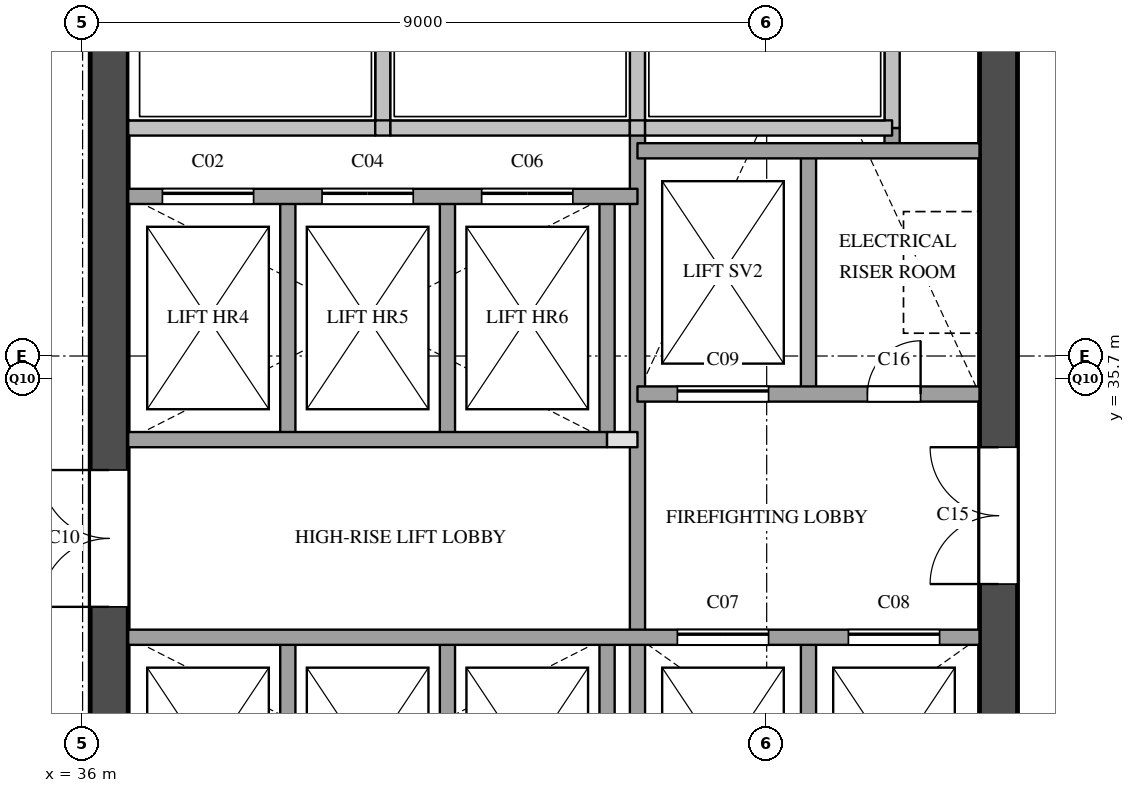
"""IFC4 building model, lengths in metres.
Left out: names, types, materials, properties, quantities, classifications, styles, units other than length and angle.
Written with IfcOpenShell. Run it as: python <this file> out.ifc"""

import sys

from ifc_helpers import new_model, si_unit, direction, frame, frame_2d, origin, place, context, subcontext, project, spatial, rectangle, extrude, element, fill, save


model = new_model("IFC4")
c1 = context("Model", 3, precision=1e-05, world=origin(), true_north=direction((0.0, 1.0)))
c2 = subcontext(c1, "Body", "Model", "MODEL_VIEW")
j1 = project(units=[si_unit("LENGTHUNIT", "METRE"), si_unit("PLANEANGLEUNIT", "RADIAN")], contexts=[c1])
p1 = place(None, origin())
s1 = spatial("IfcSite", under=j1, at=p1, CompositionType="ELEMENT")
p2 = place(p1, origin())
s2 = spatial("IfcBuilding", under=s1, at=p2, CompositionType="ELEMENT")
p3 = place(p2, frame((0.0, 0.0, 193.4)))
s3 = spatial("IfcBuildingStorey", under=s2, at=p3, CompositionType="ELEMENT", Elevation=193.4)
p4 = place(p3, frame((36.35, 29.1, 0.0), z_axis=(0.0, 0.0, 1.0), x_axis=(0.0, 1.0, 0.0)))
e1 = element("IfcWall", 1, at=p4, inside=s3, PredefinedType="SHEAR", context=c2, shape_type="SweptSolid", body=[
    extrude(rectangle(XDim=20.3, YDim=0.5, at=frame_2d((10.15, 0.0))), origin(), (0.0, 0.0, 1.0), 3.4),
])
p5 = place(p4, frame((3.6, 0.0, 0.0)))
e2 = element("IfcOpeningElement", 2, at=p5, cuts=e1, PredefinedType="OPENING", context=c2, shape_type="SweptSolid", body=[
    extrude(rectangle(XDim=1.8, YDim=2.1, at=frame_2d((0.9, 1.05))), frame((0.0, 0.26, 0.0), z_axis=(0.0, -1.0, 0.0), x_axis=(1.0, 0.0, 0.0)), (0.0, 0.0, 1.0), 0.52),
])
p6 = place(p4, frame((16.4, 0.0, 0.0)))
e3 = element("IfcOpeningElement", 3, at=p6, cuts=e1, PredefinedType="OPENING", context=c2, shape_type="SweptSolid", body=[
    extrude(rectangle(XDim=1.0, YDim=2.1, at=frame_2d((0.5, 1.05))), frame((0.0, 0.26, 0.0), z_axis=(0.0, -1.0, 0.0), x_axis=(1.0, 0.0, 0.0)), (0.0, 0.0, 1.0), 0.52),
])
p7 = place(p3, frame((48.05, 29.1, 0.0), z_axis=(0.0, 0.0, 1.0), x_axis=(0.0, 1.0, 0.0)))
e4 = element("IfcWall", 4, at=p7, inside=s3, PredefinedType="SHEAR", context=c2, shape_type="SweptSolid", body=[
    extrude(rectangle(XDim=20.3, YDim=0.5, at=frame_2d((10.15, 0.0))), origin(), (0.0, 0.0, 1.0), 3.4),
])
p8 = place(p7, frame((12.5, 0.0, 0.0)))
e5 = element("IfcOpeningElement", 5, at=p8, cuts=e4, PredefinedType="OPENING", context=c2, shape_type="SweptSolid", body=[
    extrude(rectangle(XDim=0.7, YDim=2.1, at=frame_2d((0.35, 1.05))), frame((0.0, 0.26, 0.0), z_axis=(0.0, -1.0, 0.0), x_axis=(1.0, 0.0, 0.0)), (0.0, 0.0, 1.0), 0.52),
])
p9 = place(p7, frame((3.9, 0.0, 0.0)))
e6 = element("IfcOpeningElement", 6, at=p9, cuts=e4, PredefinedType="OPENING", context=c2, shape_type="SweptSolid", body=[
    extrude(rectangle(XDim=1.8, YDim=2.1, at=frame_2d((0.9, 1.05))), frame((0.0, 0.26, 0.0), z_axis=(0.0, -1.0, 0.0), x_axis=(1.0, 0.0, 0.0)), (0.0, 0.0, 1.0), 0.52),
])
p10 = place(p3, frame((38.7, 29.1, 0.0), z_axis=(0.0, 0.0, 1.0), x_axis=(0.0, 1.0, 0.0)))
e7 = element("IfcWall", 7, at=p10, inside=s3, PredefinedType="SOLIDWALL", context=c2, shape_type="SweptSolid", body=[
    extrude(rectangle(XDim=3.2, YDim=0.2, at=frame_2d((1.6, 0.0))), origin(), (0.0, 0.0, 1.0), 3.4),
])
p11 = place(p3, frame((38.7, 34.9, 0.0), z_axis=(0.0, 0.0, 1.0), x_axis=(0.0, 1.0, 0.0)))
e8 = element("IfcWall", 8, at=p11, inside=s3, PredefinedType="SOLIDWALL", context=c2, shape_type="SweptSolid", body=[
    extrude(rectangle(XDim=3.2, YDim=0.2, at=frame_2d((1.6, 0.0))), origin(), (0.0, 0.0, 1.0), 3.4),
])
p12 = place(p3, frame((39.95, 39.0, 0.0), z_axis=(0.0, 0.0, 1.0), x_axis=(0.0, 1.0, 0.0)))
e9 = element("IfcWall", 9, at=p12, inside=s3, PredefinedType="SOLIDWALL", context=c2, shape_type="SweptSolid", body=[
    extrude(rectangle(XDim=1.78, YDim=0.2, at=frame_2d((0.89, 0.0))), origin(), (0.0, 0.0, 1.0), 3.4),
])
p13 = place(p3, frame((40.8, 29.1, 0.0), z_axis=(0.0, 0.0, 1.0), x_axis=(0.0, 1.0, 0.0)))
e10 = element("IfcWall", 10, at=p13, inside=s3, PredefinedType="SOLIDWALL", context=c2, shape_type="SweptSolid", body=[
    extrude(rectangle(XDim=3.2, YDim=0.2, at=frame_2d((1.6, 0.0))), origin(), (0.0, 0.0, 1.0), 3.4),
])
p14 = place(p3, frame((40.8, 34.9, 0.0), z_axis=(0.0, 0.0, 1.0), x_axis=(0.0, 1.0, 0.0)))
e11 = element("IfcWall", 11, at=p14, inside=s3, PredefinedType="SOLIDWALL", context=c2, shape_type="SweptSolid", body=[
    extrude(rectangle(XDim=3.2, YDim=0.2, at=frame_2d((1.6, 0.0))), origin(), (0.0, 0.0, 1.0), 3.4),
])
p15 = place(p3, frame((42.9, 29.1, 0.0), z_axis=(0.0, 0.0, 1.0), x_axis=(0.0, 1.0, 0.0)))
e12 = element("IfcWall", 12, at=p15, inside=s3, PredefinedType="SOLIDWALL", context=c2, shape_type="SweptSolid", body=[
    extrude(rectangle(XDim=3.2, YDim=0.2, at=frame_2d((1.6, 0.0))), origin(), (0.0, 0.0, 1.0), 3.4),
])
p16 = place(p3, frame((42.9, 34.9, 0.0), z_axis=(0.0, 0.0, 1.0), x_axis=(0.0, 1.0, 0.0)))
e13 = element("IfcWall", 13, at=p16, inside=s3, PredefinedType="SOLIDWALL", context=c2, shape_type="SweptSolid", body=[
    extrude(rectangle(XDim=3.2, YDim=0.2, at=frame_2d((1.6, 0.0))), origin(), (0.0, 0.0, 1.0), 3.4),
])
p17 = place(p3, frame((43.3, 29.1, 0.0), z_axis=(0.0, 0.0, 1.0), x_axis=(0.0, 1.0, 0.0)))
e14 = element("IfcWall", 14, at=p17, inside=s3, PredefinedType="SOLIDWALL", context=c2, shape_type="SweptSolid", body=[
    extrude(rectangle(XDim=9.9, YDim=0.2, at=frame_2d((4.95, 0.0))), origin(), (0.0, 0.0, 1.0), 3.4),
])
p18 = place(p3, frame((43.3, 39.0, 0.0), z_axis=(0.0, 0.0, 1.0), x_axis=(0.0, 1.0, 0.0)))
e15 = element("IfcWall", 15, at=p18, inside=s3, PredefinedType="SOLIDWALL", context=c2, shape_type="SweptSolid", body=[
    extrude(rectangle(XDim=1.78, YDim=0.2, at=frame_2d((0.89, 0.0))), origin(), (0.0, 0.0, 1.0), 3.4),
])
for number, where, z_axis, x_axis in (
    (16, (45.55, 29.1, 0.0), (0.0, 0.0, 1.0), (0.0, 1.0, 0.0)),
    (17, (45.55, 35.5, 0.0), (0.0, 0.0, 1.0), (0.0, 1.0, 0.0)),
):
    element("IfcWall", number, at=place(p3, frame(where, z_axis=z_axis, x_axis=x_axis)), inside=s3, PredefinedType="SOLIDWALL", context=c2, shape_type="SweptSolid", body=[
        extrude(rectangle(XDim=3.2, YDim=0.2, at=frame_2d((1.6, 0.0))), origin(), (0.0, 0.0, 1.0), 3.4),
    ])
p19 = place(p3, frame((46.65, 38.7, 0.0), z_axis=(0.0, 0.0, 1.0), x_axis=(0.0, 1.0, 0.0)))
e18 = element("IfcWall", 18, at=p19, inside=s3, PredefinedType="SOLIDWALL", context=c2, shape_type="SweptSolid", body=[
    extrude(rectangle(XDim=0.3, YDim=0.2, at=frame_2d((0.15, 0.0))), origin(), (0.0, 0.0, 1.0), 3.4),
])
p20 = place(p3, frame((46.65, 39.0, 0.0), z_axis=(0.0, 0.0, 1.0), x_axis=(0.0, 1.0, 0.0)))
e19 = element("IfcWall", 19, at=p20, inside=s3, PredefinedType="SOLIDWALL", context=c2, shape_type="SweptSolid", body=[
    extrude(rectangle(XDim=1.78, YDim=0.2, at=frame_2d((0.89, 0.0))), origin(), (0.0, 0.0, 1.0), 3.4),
])
p21 = place(p3, frame((36.6, 32.3, 0.0), z_axis=(0.0, 0.0, 1.0), x_axis=(1.0, 0.0, 0.0)))
e20 = element("IfcWall", 20, at=p21, inside=s3, PredefinedType="SOLIDWALL", context=c2, shape_type="SweptSolid", body=[
    extrude(rectangle(XDim=11.2, YDim=0.2, at=frame_2d((5.6, 0.0))), origin(), (0.0, 0.0, 1.0), 3.4),
])
p22 = place(p21, frame((7.225, 0.0, 0.0)))
e21 = element("IfcOpeningElement", 21, at=p22, cuts=e20, PredefinedType="OPENING", context=c2, shape_type="SweptSolid", body=[
    extrude(rectangle(XDim=1.2, YDim=2.1, at=frame_2d((0.6, 1.05))), frame((0.0, 0.11, 0.0), z_axis=(0.0, -1.0, 0.0), x_axis=(1.0, 0.0, 0.0)), (0.0, 0.0, 1.0), 0.22),
])
p23 = place(p21, frame((9.475, 0.0, 0.0)))
e22 = element("IfcOpeningElement", 22, at=p23, cuts=e20, PredefinedType="OPENING", context=c2, shape_type="SweptSolid", body=[
    extrude(rectangle(XDim=1.2, YDim=2.1, at=frame_2d((0.6, 1.05))), frame((0.0, 0.11, 0.0), z_axis=(0.0, -1.0, 0.0), x_axis=(1.0, 0.0, 0.0)), (0.0, 0.0, 1.0), 0.22),
])
p24 = place(p3, frame((42.9, 34.9, 0.0), z_axis=(0.0, 0.0, 1.0), x_axis=(1.0, 0.0, 0.0)))
e23 = element("IfcWall", 23, at=p24, inside=s3, PredefinedType="PARTITIONING", context=c2, shape_type="SweptSolid", body=[
    extrude(rectangle(XDim=0.4, YDim=0.2, at=frame_2d((0.2, 0.0))), origin(), (0.0, 0.0, 1.0), 3.4),
])
p25 = place(p3, frame((36.6, 34.9, 0.0), z_axis=(0.0, 0.0, 1.0), x_axis=(1.0, 0.0, 0.0)))
e24 = element("IfcWall", 24, at=p25, inside=s3, PredefinedType="SOLIDWALL", context=c2, shape_type="SweptSolid", body=[
    extrude(rectangle(XDim=6.3, YDim=0.2, at=frame_2d((3.15, 0.0))), origin(), (0.0, 0.0, 1.0), 3.4),
])
p26 = place(p3, frame((43.3, 35.5, 0.0), z_axis=(0.0, 0.0, 1.0), x_axis=(1.0, 0.0, 0.0)))
e25 = element("IfcWall", 25, at=p26, inside=s3, PredefinedType="SOLIDWALL", context=c2, shape_type="SweptSolid", body=[
    extrude(rectangle(XDim=4.5, YDim=0.2, at=frame_2d((2.25, 0.0))), origin(), (0.0, 0.0, 1.0), 3.4),
])
p27 = place(p26, frame((0.525, 0.0, 0.0)))
e26 = element("IfcOpeningElement", 26, at=p27, cuts=e25, PredefinedType="OPENING", context=c2, shape_type="SweptSolid", body=[
    extrude(rectangle(XDim=1.2, YDim=2.1, at=frame_2d((0.6, 1.05))), frame((0.0, 0.11, 0.0), z_axis=(0.0, -1.0, 0.0), x_axis=(1.0, 0.0, 0.0)), (0.0, 0.0, 1.0), 0.22),
])
p28 = place(p26, frame((3.025, 0.0, 0.0)))
e27 = element("IfcOpeningElement", 27, at=p28, cuts=e25, PredefinedType="OPENING", context=c2, shape_type="SweptSolid", body=[
    extrude(rectangle(XDim=0.7, YDim=2.1, at=frame_2d((0.35, 1.05))), frame((0.0, 0.11, 0.0), z_axis=(0.0, -1.0, 0.0), x_axis=(1.0, 0.0, 0.0)), (0.0, 0.0, 1.0), 0.22),
])
p29 = place(p3, frame((36.6, 38.1, 0.0), z_axis=(0.0, 0.0, 1.0), x_axis=(1.0, 0.0, 0.0)))
e28 = element("IfcWall", 28, at=p29, inside=s3, PredefinedType="SOLIDWALL", context=c2, shape_type="SweptSolid", body=[
    extrude(rectangle(XDim=6.7, YDim=0.2, at=frame_2d((3.35, 0.0))), origin(), (0.0, 0.0, 1.0), 3.4),
])
p30 = place(p29, frame((0.45, 0.0, 0.0)))
e29 = element("IfcOpeningElement", 29, at=p30, cuts=e28, PredefinedType="OPENING", context=c2, shape_type="SweptSolid", body=[
    extrude(rectangle(XDim=1.2, YDim=2.1, at=frame_2d((0.6, 1.05))), frame((0.0, 0.11, 0.0), z_axis=(0.0, -1.0, 0.0), x_axis=(1.0, 0.0, 0.0)), (0.0, 0.0, 1.0), 0.22),
])
p31 = place(p29, frame((2.55, 0.0, 0.0)))
e30 = element("IfcOpeningElement", 30, at=p31, cuts=e28, PredefinedType="OPENING", context=c2, shape_type="SweptSolid", body=[
    extrude(rectangle(XDim=1.2, YDim=2.1, at=frame_2d((0.6, 1.05))), frame((0.0, 0.11, 0.0), z_axis=(0.0, -1.0, 0.0), x_axis=(1.0, 0.0, 0.0)), (0.0, 0.0, 1.0), 0.22),
])
p32 = place(p29, frame((4.65, 0.0, 0.0)))
e31 = element("IfcOpeningElement", 31, at=p32, cuts=e28, PredefinedType="OPENING", context=c2, shape_type="SweptSolid", body=[
    extrude(rectangle(XDim=1.2, YDim=2.1, at=frame_2d((0.6, 1.05))), frame((0.0, 0.11, 0.0), z_axis=(0.0, -1.0, 0.0), x_axis=(1.0, 0.0, 0.0)), (0.0, 0.0, 1.0), 0.22),
])
p33 = place(p3, frame((43.3, 38.7, 0.0), z_axis=(0.0, 0.0, 1.0), x_axis=(1.0, 0.0, 0.0)))
e32 = element("IfcWall", 32, at=p33, inside=s3, PredefinedType="SOLIDWALL", context=c2, shape_type="SweptSolid", body=[
    extrude(rectangle(XDim=4.5, YDim=0.2, at=frame_2d((2.25, 0.0))), origin(), (0.0, 0.0, 1.0), 3.4),
])
p34 = place(p3, frame((36.6, 39.0, 0.0), z_axis=(0.0, 0.0, 1.0), x_axis=(1.0, 0.0, 0.0)))
e33 = element("IfcWall", 33, at=p34, inside=s3, PredefinedType="SOLIDWALL", context=c2, shape_type="SweptSolid", body=[
    extrude(rectangle(XDim=3.25, YDim=0.2, at=frame_2d((1.625, 0.0))), origin(), (0.0, 0.0, 1.0), 3.4),
])
p35 = place(p3, frame((39.85, 39.0, 0.0), z_axis=(0.0, 0.0, 1.0), x_axis=(1.0, 0.0, 0.0)))
e34 = element("IfcWall", 34, at=p35, inside=s3, PredefinedType="SOLIDWALL", context=c2, shape_type="SweptSolid", body=[
    extrude(rectangle(XDim=0.2, YDim=0.2, at=frame_2d((0.1, 0.0))), origin(), (0.0, 0.0, 1.0), 3.4),
])
p36 = place(p3, frame((40.05, 39.0, 0.0), z_axis=(0.0, 0.0, 1.0), x_axis=(1.0, 0.0, 0.0)))
e35 = element("IfcWall", 35, at=p36, inside=s3, PredefinedType="SOLIDWALL", context=c2, shape_type="SweptSolid", body=[
    extrude(rectangle(XDim=3.15, YDim=0.2, at=frame_2d((1.575, 0.0))), origin(), (0.0, 0.0, 1.0), 3.4),
])
p37 = place(p3, frame((43.2, 39.0, 0.0), z_axis=(0.0, 0.0, 1.0), x_axis=(1.0, 0.0, 0.0)))
e36 = element("IfcWall", 36, at=p37, inside=s3, PredefinedType="SOLIDWALL", context=c2, shape_type="SweptSolid", body=[
    extrude(rectangle(XDim=0.2, YDim=0.2, at=frame_2d((0.1, 0.0))), origin(), (0.0, 0.0, 1.0), 3.4),
])
p38 = place(p3, frame((43.4, 39.0, 0.0), z_axis=(0.0, 0.0, 1.0), x_axis=(1.0, 0.0, 0.0)))
e37 = element("IfcWall", 37, at=p38, inside=s3, PredefinedType="SOLIDWALL", context=c2, shape_type="SweptSolid", body=[
    extrude(rectangle(XDim=3.25, YDim=0.2, at=frame_2d((1.625, 0.0))), origin(), (0.0, 0.0, 1.0), 3.4),
])
p39 = place(p30, origin())
e38 = element("IfcDoor", 38, at=p39, inside=s3, OperationType="SLIDING_TO_LEFT", PredefinedType="DOOR", context=c2, shape_type="SweptSolid", body=[
    extrude(rectangle(XDim=1.2, YDim=2.1, at=frame_2d((0.6, 1.05))), frame((0.0, 0.025, 0.0), z_axis=(0.0, -1.0, 0.0), x_axis=(1.0, 0.0, 0.0)), (0.0, 0.0, 1.0), 0.05),
])
fill(e29, e38)
p40 = place(p31, origin())
e39 = element("IfcDoor", 39, at=p40, inside=s3, OperationType="SLIDING_TO_LEFT", PredefinedType="DOOR", context=c2, shape_type="SweptSolid", body=[
    extrude(rectangle(XDim=1.2, YDim=2.1, at=frame_2d((0.6, 1.05))), frame((0.0, 0.025, 0.0), z_axis=(0.0, -1.0, 0.0), x_axis=(1.0, 0.0, 0.0)), (0.0, 0.0, 1.0), 0.05),
])
fill(e30, e39)
p41 = place(p32, origin())
e40 = element("IfcDoor", 40, at=p41, inside=s3, OperationType="SLIDING_TO_LEFT", PredefinedType="DOOR", context=c2, shape_type="SweptSolid", body=[
    extrude(rectangle(XDim=1.2, YDim=2.1, at=frame_2d((0.6, 1.05))), frame((0.0, 0.025, 0.0), z_axis=(0.0, -1.0, 0.0), x_axis=(1.0, 0.0, 0.0)), (0.0, 0.0, 1.0), 0.05),
])
fill(e31, e40)
p42 = place(p22, origin())
e41 = element("IfcDoor", 41, at=p42, inside=s3, OperationType="SLIDING_TO_LEFT", PredefinedType="DOOR", context=c2, shape_type="SweptSolid", body=[
    extrude(rectangle(XDim=1.2, YDim=2.1, at=frame_2d((0.6, 1.05))), frame((0.0, 0.025, 0.0), z_axis=(0.0, -1.0, 0.0), x_axis=(1.0, 0.0, 0.0)), (0.0, 0.0, 1.0), 0.05),
])
fill(e21, e41)
p43 = place(p23, origin())
e42 = element("IfcDoor", 42, at=p43, inside=s3, OperationType="SLIDING_TO_LEFT", PredefinedType="DOOR", context=c2, shape_type="SweptSolid", body=[
    extrude(rectangle(XDim=1.2, YDim=2.1, at=frame_2d((0.6, 1.05))), frame((0.0, 0.025, 0.0), z_axis=(0.0, -1.0, 0.0), x_axis=(1.0, 0.0, 0.0)), (0.0, 0.0, 1.0), 0.05),
])
fill(e22, e42)
p44 = place(p27, origin())
e43 = element("IfcDoor", 43, at=p44, inside=s3, OperationType="SLIDING_TO_LEFT", PredefinedType="DOOR", context=c2, shape_type="SweptSolid", body=[
    extrude(rectangle(XDim=1.2, YDim=2.1, at=frame_2d((0.6, 1.05))), frame((0.0, 0.025, 0.0), z_axis=(0.0, -1.0, 0.0), x_axis=(1.0, 0.0, 0.0)), (0.0, 0.0, 1.0), 0.05),
])
fill(e26, e43)
p45 = place(p5, origin())
e44 = element("IfcDoor", 44, at=p45, inside=s3, OperationType="DOUBLE_DOOR_SINGLE_SWING", PredefinedType="DOOR", context=c2, shape_type="SweptSolid", body=[
    extrude(rectangle(XDim=1.8, YDim=2.1, at=frame_2d((0.9, 1.05))), frame((0.0, 0.025, 0.0), z_axis=(0.0, -1.0, 0.0), x_axis=(1.0, 0.0, 0.0)), (0.0, 0.0, 1.0), 0.05),
])
fill(e2, e44)
p46 = place(p9, origin())
e45 = element("IfcDoor", 45, at=p46, inside=s3, OperationType="DOUBLE_DOOR_SINGLE_SWING", PredefinedType="DOOR", context=c2, shape_type="SweptSolid", body=[
    extrude(rectangle(XDim=1.8, YDim=2.1, at=frame_2d((0.9, 1.05))), frame((0.0, 0.025, 0.0), z_axis=(0.0, -1.0, 0.0), x_axis=(1.0, 0.0, 0.0)), (0.0, 0.0, 1.0), 0.05),
])
fill(e6, e45)
p47 = place(p28, origin())
e46 = element("IfcDoor", 46, at=p47, inside=s3, OperationType="SINGLE_SWING_RIGHT", PredefinedType="DOOR", context=c2, shape_type="SweptSolid", body=[
    extrude(rectangle(XDim=0.7, YDim=2.1, at=frame_2d((0.35, 1.05))), frame((0.0, 0.025, 0.0), z_axis=(0.0, -1.0, 0.0), x_axis=(1.0, 0.0, 0.0)), (0.0, 0.0, 1.0), 0.05),
])
fill(e27, e46)
save(model, sys.argv[1])
